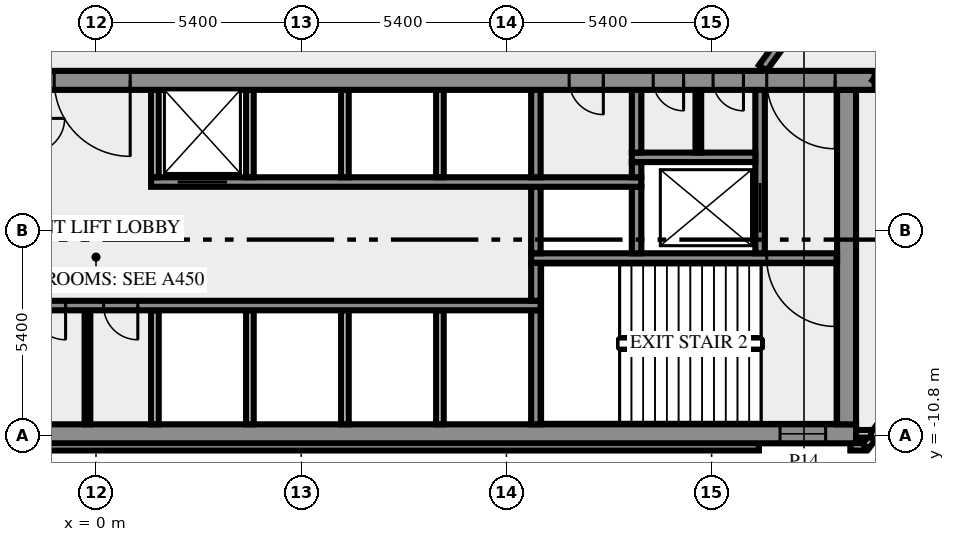
"""IFC4 building model, lengths in metres.
Left out: names, types, materials, properties, quantities, classifications, styles, units other than length and angle.
Written with IfcOpenShell. Run it as: python <this file> out.ifc"""

import sys

from ifc_helpers import new_model, si_unit, direction, frame, frame_2d, origin, place, context, subcontext, project, spatial, rectangle, extrude, element, fill, save


model = new_model("IFC4")
c1 = context("Model", 3, precision=1e-05, world=origin(), true_north=direction((0.0, 1.0)))
c2 = subcontext(c1, "Body", "Model", "MODEL_VIEW")
j1 = project(units=[si_unit("LENGTHUNIT", "METRE"), si_unit("PLANEANGLEUNIT", "RADIAN")], contexts=[c1])
p1 = place(None, origin())
s1 = spatial("IfcSite", under=j1, at=p1, CompositionType="ELEMENT")
p2 = place(p1, origin())
s2 = spatial("IfcBuilding", under=s1, at=p2, CompositionType="ELEMENT")
p3 = place(p2, frame((0.0, 0.0, 25.0)))
s3 = spatial("IfcBuildingStorey", under=s2, at=p3, CompositionType="ELEMENT", Elevation=25.0)
p4 = place(p3, frame((-17.444, -11.088, 0.0), z_axis=(0.0, 0.0, 1.0), x_axis=(1.0, 0.0, 0.0)))
e1 = element("IfcWall", 1, at=p4, inside=s3, PredefinedType="SOLIDWALL", context=c2, shape_type="SweptSolid", body=[
    extrude(rectangle(XDim=34.888, YDim=0.2, at=frame_2d((17.444, 0.0))), origin(), (0.0, 0.0, 1.0), 5.65),
])
p5 = place(p3, frame((19.85, -11.088, 0.0), z_axis=(0.0, 0.0, 1.0), x_axis=(1.0, 0.0, 0.0)))
e2 = element("IfcWall", 2, at=p5, inside=s3, PredefinedType="SOLIDWALL", context=c2, shape_type="SweptSolid", body=[
    extrude(rectangle(XDim=0.406, YDim=0.2, at=frame_2d((0.203, 0.0))), origin(), (0.0, 0.0, 1.0), 5.65),
])
p6 = place(p3, frame((20.253, -11.083, 0.0), z_axis=(0.0, 0.0, 1.0), x_axis=(0.587766567315, 0.809030569476, 0.0)))
e3 = element("IfcWall", 3, at=p6, inside=s3, PredefinedType="SOLIDWALL", context=c2, shape_type="SweptSolid", body=[
    extrude(rectangle(XDim=2.688, YDim=0.2, at=frame_2d((1.344, 0.0))), origin(), (0.0, 0.0, 1.0), 5.65),
])
p7 = place(p3, frame((19.98, -10.75, 0.0), z_axis=(0.0, 0.0, 1.0), x_axis=(1.0, 0.0, 0.0)))
e4 = element("IfcWall", 4, at=p7, inside=s3, PredefinedType="SOLIDWALL", context=c2, shape_type="SweptSolid", body=[
    extrude(rectangle(XDim=0.417, YDim=0.2, at=frame_2d((0.208, 0.0))), origin(), (0.0, 0.0, 1.0), 5.65),
])
p8 = place(p3, frame((-20.0, -10.75, 0.0), z_axis=(0.0, 0.0, 1.0), x_axis=(1.0, 0.0, 0.0)))
e5 = element("IfcWall", 5, at=p8, inside=s3, PredefinedType="SHEAR", context=c2, shape_type="SweptSolid", body=[
    extrude(rectangle(XDim=40.0, YDim=0.5, at=frame_2d((20.0, 0.0))), origin(), (0.0, 0.0, 1.0), 5.65),
])
p9 = place(p8, frame((0.8, 0.0, 1.0)))
e6 = element("IfcOpeningElement", 6, at=p9, cuts=e5, PredefinedType="OPENING", context=c2, shape_type="SweptSolid", body=[
    extrude(rectangle(XDim=1.2, YDim=1.2, at=frame_2d((0.6, 0.6))), frame((0.0, 0.26, 0.0), z_axis=(0.0, -1.0, 0.0), x_axis=(1.0, 0.0, 0.0)), (0.0, 0.0, 1.0), 0.52),
])
p10 = place(p8, frame((38.0, 0.0, 1.0)))
e7 = element("IfcOpeningElement", 7, at=p10, cuts=e5, PredefinedType="OPENING", context=c2, shape_type="SweptSolid", body=[
    extrude(rectangle(XDim=1.2, YDim=1.2, at=frame_2d((0.6, 0.6))), frame((0.0, 0.26, 0.0), z_axis=(0.0, -1.0, 0.0), x_axis=(1.0, 0.0, 0.0)), (0.0, 0.0, 1.0), 0.52),
])
p11 = place(p3, frame((-0.225, -10.5, 0.0), z_axis=(0.0, 0.0, 1.0), x_axis=(0.0, 1.0, 0.0)))
e8 = element("IfcWall", 8, at=p11, inside=s3, PredefinedType="PARTITIONING", context=c2, shape_type="SweptSolid", body=[
    extrude(rectangle(XDim=3.0, YDim=0.15, at=frame_2d((1.5, 0.0))), origin(), (0.0, 0.0, 1.0), 5.65),
])
for number, where, z_axis, x_axis in (
    (9, (1.55, -10.5, 0.0), (0.0, 0.0, 1.0), (0.0, 1.0, 0.0)),
    (10, (4.05, -10.5, 0.0), (0.0, 0.0, 1.0), (0.0, 1.0, 0.0)),
    (11, (6.55, -10.5, 0.0), (0.0, 0.0, 1.0), (0.0, 1.0, 0.0)),
    (12, (9.05, -10.5, 0.0), (0.0, 0.0, 1.0), (0.0, 1.0, 0.0)),
):
    element("IfcWall", number, at=place(p3, frame(where, z_axis=z_axis, x_axis=x_axis)), inside=s3, PredefinedType="SOLIDWALL", context=c2, shape_type="SweptSolid", body=[
        extrude(rectangle(XDim=3.0, YDim=0.2, at=frame_2d((1.5, 0.0))), origin(), (0.0, 0.0, 1.0), 5.65),
    ])
p12 = place(p3, frame((11.575, -10.5, 0.0), z_axis=(0.0, 0.0, 1.0), x_axis=(0.0, 1.0, 0.0)))
e13 = element("IfcWall", 13, at=p12, inside=s3, PredefinedType="SHEAR", context=c2, shape_type="SweptSolid", body=[
    extrude(rectangle(XDim=3.0, YDim=0.25, at=frame_2d((1.5, 0.0))), origin(), (0.0, 0.0, 1.0), 5.65),
])
p13 = place(p3, frame((19.75, -10.5, 0.0), z_axis=(0.0, 0.0, 1.0), x_axis=(0.0, 1.0, 0.0)))
e14 = element("IfcWall", 14, at=p13, inside=s3, PredefinedType="SHEAR", context=c2, shape_type="SweptSolid", body=[
    extrude(rectangle(XDim=8.8, YDim=0.5, at=frame_2d((4.4, 0.0))), origin(), (0.0, 0.0, 1.0), 5.65),
])
p14 = place(p3, frame((11.7, -7.375, 0.0), z_axis=(0.0, 0.0, 1.0), x_axis=(-1.0, 0.0, 0.0)))
e15 = element("IfcWall", 15, at=p14, inside=s3, PredefinedType="SHEAR", context=c2, shape_type="SweptSolid", body=[
    extrude(rectangle(XDim=23.4, YDim=0.25, at=frame_2d((11.7, 0.0))), origin(), (0.0, 0.0, 1.0), 5.65),
])
p15 = place(p14, frame((14.4, 0.0, 0.0)))
e16 = element("IfcOpeningElement", 16, at=p15, cuts=e15, PredefinedType="OPENING", context=c2, shape_type="SweptSolid", body=[
    extrude(rectangle(XDim=0.9, YDim=2.1, at=frame_2d((0.45, 1.05))), frame((0.0, 0.135, 0.0), z_axis=(0.0, -1.0, 0.0), x_axis=(1.0, 0.0, 0.0)), (0.0, 0.0, 1.0), 0.27),
])
p16 = place(p14, frame((12.5, 0.0, 0.0)))
e17 = element("IfcOpeningElement", 17, at=p16, cuts=e15, PredefinedType="OPENING", context=c2, shape_type="SweptSolid", body=[
    extrude(rectangle(XDim=0.9, YDim=2.1, at=frame_2d((0.45, 1.05))), frame((0.0, 0.135, 0.0), z_axis=(0.0, -1.0, 0.0), x_axis=(1.0, 0.0, 0.0)), (0.0, 0.0, 1.0), 0.27),
])
p17 = place(p14, frame((10.6, 0.0, 0.0)))
e18 = element("IfcOpeningElement", 18, at=p17, cuts=e15, PredefinedType="OPENING", context=c2, shape_type="SweptSolid", body=[
    extrude(rectangle(XDim=0.9, YDim=2.1, at=frame_2d((0.45, 1.05))), frame((0.0, 0.135, 0.0), z_axis=(0.0, -1.0, 0.0), x_axis=(1.0, 0.0, 0.0)), (0.0, 0.0, 1.0), 0.27),
])
p18 = place(p3, frame((11.575, -7.25, 0.0), z_axis=(0.0, 0.0, 1.0), x_axis=(0.0, 1.0, 0.0)))
e19 = element("IfcWall", 19, at=p18, inside=s3, PredefinedType="SHEAR", context=c2, shape_type="SweptSolid", body=[
    extrude(rectangle(XDim=1.0, YDim=0.25, at=frame_2d((0.5, 0.0))), origin(), (0.0, 0.0, 1.0), 5.65),
])
p19 = place(p3, frame((19.5, -6.125, 0.0), z_axis=(0.0, 0.0, 1.0), x_axis=(-1.0, 0.0, 0.0)))
e20 = element("IfcWall", 20, at=p19, inside=s3, PredefinedType="SHEAR", context=c2, shape_type="SweptSolid", body=[
    extrude(rectangle(XDim=8.05, YDim=0.25, at=frame_2d((4.025, 0.0))), origin(), (0.0, 0.0, 1.0), 5.65),
])
p20 = place(p19, frame((0.05, 0.0, 0.0)))
e21 = element("IfcOpeningElement", 21, at=p20, cuts=e20, PredefinedType="OPENING", context=c2, shape_type="SweptSolid", body=[
    extrude(rectangle(XDim=1.8, YDim=2.1, at=frame_2d((0.9, 1.05))), frame((0.0, 0.135, 0.0), z_axis=(0.0, -1.0, 0.0), x_axis=(1.0, 0.0, 0.0)), (0.0, 0.0, 1.0), 0.27),
])
for number, where, z_axis, x_axis in (
    (22, (11.575, -6.0, 0.0), (0.0, 0.0, 1.0), (0.0, 1.0, 0.0)),
    (23, (14.225, -6.0, 0.0), (0.0, 0.0, 1.0), (0.0, 1.0, 0.0)),
):
    element("IfcWall", number, at=place(p3, frame(where, z_axis=z_axis, x_axis=x_axis)), inside=s3, PredefinedType="SHEAR", context=c2, shape_type="SweptSolid", body=[
        extrude(rectangle(XDim=1.75, YDim=0.25, at=frame_2d((0.875, 0.0))), origin(), (0.0, 0.0, 1.0), 5.65),
    ])
p21 = place(p3, frame((17.475, -6.0, 0.0), z_axis=(0.0, 0.0, 1.0), x_axis=(0.0, 1.0, 0.0)))
e24 = element("IfcWall", 24, at=p21, inside=s3, PredefinedType="SHEAR", context=c2, shape_type="SweptSolid", body=[
    extrude(rectangle(XDim=4.3, YDim=0.25, at=frame_2d((2.15, 0.0))), origin(), (0.0, 0.0, 1.0), 5.65),
])
p22 = place(p21, frame((0.55, 0.0, 0.0)))
e25 = element("IfcOpeningElement", 25, at=p22, cuts=e24, PredefinedType="OPENING", context=c2, shape_type="SweptSolid", body=[
    extrude(rectangle(XDim=1.3, YDim=2.1, at=frame_2d((0.65, 1.05))), frame((0.0, 0.135, 0.0), z_axis=(0.0, -1.0, 0.0), x_axis=(1.0, 0.0, 0.0)), (0.0, 0.0, 1.0), 0.27),
])
p23 = place(p3, frame((1.45, -4.125, 0.0), z_axis=(0.0, 0.0, 1.0), x_axis=(1.0, 0.0, 0.0)))
e26 = element("IfcWall", 26, at=p23, inside=s3, PredefinedType="SHEAR", context=c2, shape_type="SweptSolid", body=[
    extrude(rectangle(XDim=12.9, YDim=0.25, at=frame_2d((6.45, 0.0))), origin(), (0.0, 0.0, 1.0), 5.65),
])
p24 = place(p23, frame((0.7, 0.0, 0.0)))
e27 = element("IfcOpeningElement", 27, at=p24, cuts=e26, PredefinedType="OPENING", context=c2, shape_type="SweptSolid", body=[
    extrude(rectangle(XDim=1.3, YDim=2.1, at=frame_2d((0.65, 1.05))), frame((0.0, 0.135, 0.0), z_axis=(0.0, -1.0, 0.0), x_axis=(1.0, 0.0, 0.0)), (0.0, 0.0, 1.0), 0.27),
])
for number, where, z_axis, x_axis in (
    (28, (1.55, -4.0, 0.0), (0.0, 0.0, 1.0), (0.0, 1.0, 0.0)),
    (29, (4.05, -4.0, 0.0), (0.0, 0.0, 1.0), (0.0, 1.0, 0.0)),
    (30, (6.55, -4.0, 0.0), (0.0, 0.0, 1.0), (0.0, 1.0, 0.0)),
    (31, (9.05, -4.0, 0.0), (0.0, 0.0, 1.0), (0.0, 1.0, 0.0)),
):
    element("IfcWall", number, at=place(p3, frame(where, z_axis=z_axis, x_axis=x_axis)), inside=s3, PredefinedType="SOLIDWALL", context=c2, shape_type="SweptSolid", body=[
        extrude(rectangle(XDim=2.3, YDim=0.2, at=frame_2d((1.15, 0.0))), origin(), (0.0, 0.0, 1.0), 5.65),
    ])
p25 = place(p3, frame((11.575, -4.0, 0.0), z_axis=(0.0, 0.0, 1.0), x_axis=(0.0, 1.0, 0.0)))
e32 = element("IfcWall", 32, at=p25, inside=s3, PredefinedType="SHEAR", context=c2, shape_type="SweptSolid", body=[
    extrude(rectangle(XDim=2.3, YDim=0.25, at=frame_2d((1.15, 0.0))), origin(), (0.0, 0.0, 1.0), 5.65),
])
p26 = place(p3, frame((14.225, -4.0, 0.0), z_axis=(0.0, 0.0, 1.0), x_axis=(0.0, 1.0, 0.0)))
e33 = element("IfcWall", 33, at=p26, inside=s3, PredefinedType="SHEAR", context=c2, shape_type="SweptSolid", body=[
    extrude(rectangle(XDim=0.4, YDim=0.25, at=frame_2d((0.2, 0.0))), origin(), (0.0, 0.0, 1.0), 5.65),
])
p27 = place(p3, frame((14.1, -3.475, 0.0), z_axis=(0.0, 0.0, 1.0), x_axis=(1.0, 0.0, 0.0)))
e34 = element("IfcWall", 34, at=p27, inside=s3, PredefinedType="SHEAR", context=c2, shape_type="SweptSolid", body=[
    extrude(rectangle(XDim=3.25, YDim=0.25, at=frame_2d((1.625, 0.0))), origin(), (0.0, 0.0, 1.0), 5.65),
])
p28 = place(p3, frame((14.225, -3.35, 0.0), z_axis=(0.0, 0.0, 1.0), x_axis=(0.0, 1.0, 0.0)))
e35 = element("IfcWall", 35, at=p28, inside=s3, PredefinedType="SHEAR", context=c2, shape_type="SweptSolid", body=[
    extrude(rectangle(XDim=1.65, YDim=0.25, at=frame_2d((0.825, 0.0))), origin(), (0.0, 0.0, 1.0), 5.65),
])
p29 = place(p3, frame((15.85, -3.35, 0.0), z_axis=(0.0, 0.0, 1.0), x_axis=(0.0, 1.0, 0.0)))
e36 = element("IfcWall", 36, at=p29, inside=s3, PredefinedType="PARTITIONING", context=c2, shape_type="SweptSolid", body=[
    extrude(rectangle(XDim=1.65, YDim=0.15, at=frame_2d((0.825, 0.0))), origin(), (0.0, 0.0, 1.0), 5.65),
])
p30 = place(p3, frame((20.49, -1.45, 0.0), z_axis=(0.0, 0.0, 1.0), x_axis=(-1.0, 0.0, 0.0)))
e37 = element("IfcWall", 37, at=p30, inside=s3, PredefinedType="SHEAR", context=c2, shape_type="SweptSolid", body=[
    extrude(rectangle(XDim=40.98, YDim=0.5, at=frame_2d((20.49, 0.0))), origin(), (0.0, 0.0, 1.0), 5.65),
])
p31 = place(p30, frame((38.14, 0.0, 0.0)))
e38 = element("IfcOpeningElement", 38, at=p31, cuts=e37, PredefinedType="OPENING", context=c2, shape_type="SweptSolid", body=[
    extrude(rectangle(XDim=1.8, YDim=2.1, at=frame_2d((0.9, 1.05))), frame((0.0, 0.26, 0.0), z_axis=(0.0, -1.0, 0.0), x_axis=(1.0, 0.0, 0.0)), (0.0, 0.0, 1.0), 0.52),
])
p32 = place(p30, frame((35.89, 0.0, 0.0)))
e39 = element("IfcOpeningElement", 39, at=p32, cuts=e37, PredefinedType="OPENING", context=c2, shape_type="SweptSolid", body=[
    extrude(rectangle(XDim=0.9, YDim=2.1, at=frame_2d((0.45, 1.05))), frame((0.0, 0.26, 0.0), z_axis=(0.0, -1.0, 0.0), x_axis=(1.0, 0.0, 0.0)), (0.0, 0.0, 1.0), 0.52),
])
p33 = place(p30, frame((32.94, 0.0, 0.0)))
e40 = element("IfcOpeningElement", 40, at=p33, cuts=e37, PredefinedType="OPENING", context=c2, shape_type="SweptSolid", body=[
    extrude(rectangle(XDim=0.9, YDim=2.1, at=frame_2d((0.45, 1.05))), frame((0.0, 0.26, 0.0), z_axis=(0.0, -1.0, 0.0), x_axis=(1.0, 0.0, 0.0)), (0.0, 0.0, 1.0), 0.52),
])
p34 = place(p30, frame((19.59, 0.0, 0.0)))
e41 = element("IfcOpeningElement", 41, at=p34, cuts=e37, PredefinedType="OPENING", context=c2, shape_type="SweptSolid", body=[
    extrude(rectangle(XDim=2.0, YDim=2.1, at=frame_2d((1.0, 1.05))), frame((0.0, 0.26, 0.0), z_axis=(0.0, -1.0, 0.0), x_axis=(1.0, 0.0, 0.0)), (0.0, 0.0, 1.0), 0.52),
])
p35 = place(p30, frame((7.14, 0.0, 0.0)))
e42 = element("IfcOpeningElement", 42, at=p35, cuts=e37, PredefinedType="OPENING", context=c2, shape_type="SweptSolid", body=[
    extrude(rectangle(XDim=0.9, YDim=2.1, at=frame_2d((0.45, 1.05))), frame((0.0, 0.26, 0.0), z_axis=(0.0, -1.0, 0.0), x_axis=(1.0, 0.0, 0.0)), (0.0, 0.0, 1.0), 0.52),
])
p36 = place(p30, frame((5.028, 0.0, 0.0)))
e43 = element("IfcOpeningElement", 43, at=p36, cuts=e37, PredefinedType="OPENING", context=c2, shape_type="SweptSolid", body=[
    extrude(rectangle(XDim=0.8, YDim=2.1, at=frame_2d((0.4, 1.05))), frame((0.0, 0.26, 0.0), z_axis=(0.0, -1.0, 0.0), x_axis=(1.0, 0.0, 0.0)), (0.0, 0.0, 1.0), 0.52),
])
p37 = place(p30, frame((3.452, 0.0, 0.0)))
e44 = element("IfcOpeningElement", 44, at=p37, cuts=e37, PredefinedType="OPENING", context=c2, shape_type="SweptSolid", body=[
    extrude(rectangle(XDim=0.8, YDim=2.1, at=frame_2d((0.4, 1.05))), frame((0.0, 0.26, 0.0), z_axis=(0.0, -1.0, 0.0), x_axis=(1.0, 0.0, 0.0)), (0.0, 0.0, 1.0), 0.52),
])
p38 = place(p30, frame((1.04, 0.0, 0.0)))
e45 = element("IfcOpeningElement", 45, at=p38, cuts=e37, PredefinedType="OPENING", context=c2, shape_type="SweptSolid", body=[
    extrude(rectangle(XDim=1.8, YDim=2.1, at=frame_2d((0.9, 1.05))), frame((0.0, 0.26, 0.0), z_axis=(0.0, -1.0, 0.0), x_axis=(1.0, 0.0, 0.0)), (0.0, 0.0, 1.0), 0.52),
])
p39 = place(p3, frame((49.989, 39.022, 0.0), z_axis=(0.0, 0.0, 1.0), x_axis=(-0.587782625701, -0.809018902699, 0.0)))
e46 = element("IfcWall", 46, at=p39, inside=s3, PredefinedType="SOLIDWALL", context=c2, shape_type="SweptSolid", body=[
    extrude(rectangle(XDim=50.117, YDim=0.25, at=frame_2d((25.058, 0.0))), origin(), (0.0, 0.0, 1.0), 5.65),
])
p40 = place(p39, frame((37.051, 0.0, 0.0)))
e47 = element("IfcOpeningElement", 47, at=p40, cuts=e46, PredefinedType="OPENING", context=c2, shape_type="SweptSolid", body=[
    extrude(rectangle(XDim=1.2, YDim=2.1, at=frame_2d((0.6, 1.05))), frame((0.0, 0.135, 0.0), z_axis=(0.0, -1.0, 0.0), x_axis=(1.0, 0.0, 0.0)), (0.0, 0.0, 1.0), 0.27),
])
p41 = place(p39, frame((20.851, 0.0, 0.0)))
e48 = element("IfcOpeningElement", 48, at=p41, cuts=e46, PredefinedType="OPENING", context=c2, shape_type="SweptSolid", body=[
    extrude(rectangle(XDim=1.2, YDim=2.1, at=frame_2d((0.6, 1.05))), frame((0.0, 0.135, 0.0), z_axis=(0.0, -1.0, 0.0), x_axis=(1.0, 0.0, 0.0)), (0.0, 0.0, 1.0), 0.27),
])
p42 = place(p39, frame((48.384, 0.0, 0.0)))
e49 = element("IfcOpeningElement", 49, at=p42, cuts=e46, PredefinedType="OPENING", context=c2, shape_type="SweptSolid", body=[
    extrude(rectangle(XDim=1.2, YDim=2.1, at=frame_2d((0.6, 1.05))), frame((0.0, 0.135, 0.0), z_axis=(0.0, -1.0, 0.0), x_axis=(1.0, 0.0, 0.0)), (0.0, 0.0, 1.0), 0.27),
])
p43 = place(p39, frame((26.45, 0.0, 0.0)))
e50 = element("IfcOpeningElement", 50, at=p43, cuts=e46, PredefinedType="OPENING", context=c2, shape_type="SweptSolid", body=[
    extrude(rectangle(XDim=1.0, YDim=2.1, at=frame_2d((0.5, 1.05))), frame((0.0, 0.135, 0.0), z_axis=(0.0, -1.0, 0.0), x_axis=(1.0, 0.0, 0.0)), (0.0, 0.0, 1.0), 0.27),
])
p44 = place(p3, frame((17.545, -1.125, 0.0), z_axis=(0.0, 0.0, 1.0), x_axis=(0.587786323093, 0.809016216391, 0.0)))
e51 = element("IfcWall", 51, at=p44, inside=s3, PredefinedType="SOLIDWALL", context=c2, shape_type="SweptSolid", body=[
    extrude(rectangle(XDim=33.493, YDim=0.25, at=frame_2d((16.747, 0.0))), origin(), (0.0, 0.0, 1.0), 5.65),
])
p45 = place(p44, frame((24.508, 0.0, 0.0)))
e52 = element("IfcOpeningElement", 52, at=p45, cuts=e51, PredefinedType="OPENING", context=c2, shape_type="SweptSolid", body=[
    extrude(rectangle(XDim=1.2, YDim=2.1, at=frame_2d((0.6, 1.05))), frame((0.0, 0.135, 0.0), z_axis=(0.0, -1.0, 0.0), x_axis=(1.0, 0.0, 0.0)), (0.0, 0.0, 1.0), 0.27),
])
p46 = place(p44, frame((17.207, 0.0, 0.0)))
e53 = element("IfcOpeningElement", 53, at=p46, cuts=e51, PredefinedType="OPENING", context=c2, shape_type="SweptSolid", body=[
    extrude(rectangle(XDim=1.2, YDim=2.1, at=frame_2d((0.6, 1.05))), frame((0.0, 0.135, 0.0), z_axis=(0.0, -1.0, 0.0), x_axis=(1.0, 0.0, 0.0)), (0.0, 0.0, 1.0), 0.27),
])
p47 = place(p44, frame((22.908, 0.0, 0.0)))
e54 = element("IfcOpeningElement", 54, at=p47, cuts=e51, PredefinedType="OPENING", context=c2, shape_type="SweptSolid", body=[
    extrude(rectangle(XDim=0.9, YDim=2.1, at=frame_2d((0.45, 1.05))), frame((0.0, 0.135, 0.0), z_axis=(0.0, -1.0, 0.0), x_axis=(1.0, 0.0, 0.0)), (0.0, 0.0, 1.0), 0.27),
])
p48 = place(p10, origin())
e55 = element("IfcWindow", 55, at=p48, inside=s3, PartitioningType="SINGLE_PANEL", PredefinedType="WINDOW", context=c2, shape_type="SweptSolid", body=[
    extrude(rectangle(XDim=1.2, YDim=1.2, at=frame_2d((0.6, 0.6))), frame((0.0, 0.03, 0.0), z_axis=(0.0, -1.0, 0.0), x_axis=(1.0, 0.0, 0.0)), (0.0, 0.0, 1.0), 0.06),
])
fill(e7, e55)
p49 = place(p16, origin())
e56 = element("IfcDoor", 56, at=p49, inside=s3, OperationType="SINGLE_SWING_RIGHT", PredefinedType="DOOR", context=c2, shape_type="SweptSolid", body=[
    extrude(rectangle(XDim=0.9, YDim=2.1, at=frame_2d((0.45, 1.05))), frame((0.0, 0.025, 0.0), z_axis=(0.0, -1.0, 0.0), x_axis=(1.0, 0.0, 0.0)), (0.0, 0.0, 1.0), 0.05),
])
fill(e17, e56)
p50 = place(p17, origin())
e57 = element("IfcDoor", 57, at=p50, inside=s3, OperationType="SINGLE_SWING_LEFT", PredefinedType="DOOR", context=c2, shape_type="SweptSolid", body=[
    extrude(rectangle(XDim=0.9, YDim=2.1, at=frame_2d((0.45, 1.05))), frame((0.0, 0.025, 0.0), z_axis=(0.0, -1.0, 0.0), x_axis=(1.0, 0.0, 0.0)), (0.0, 0.0, 1.0), 0.05),
])
fill(e18, e57)
p51 = place(p20, origin())
e58 = element("IfcDoor", 58, at=p51, inside=s3, OperationType="DOUBLE_DOOR_SINGLE_SWING", PredefinedType="DOOR", context=c2, shape_type="SweptSolid", body=[
    extrude(rectangle(XDim=1.8, YDim=2.1, at=frame_2d((0.9, 1.05))), frame((0.0, 0.025, 0.0), z_axis=(0.0, -1.0, 0.0), x_axis=(1.0, 0.0, 0.0)), (0.0, 0.0, 1.0), 0.05),
])
fill(e21, e58)
p52 = place(p22, origin())
e59 = element("IfcDoor", 59, at=p52, inside=s3, OperationType="DOUBLE_DOOR_SLIDING", PredefinedType="DOOR", context=c2, shape_type="SweptSolid", body=[
    extrude(rectangle(XDim=1.3, YDim=2.1, at=frame_2d((0.65, 1.05))), frame((0.0, 0.025, 0.0), z_axis=(0.0, -1.0, 0.0), x_axis=(1.0, 0.0, 0.0)), (0.0, 0.0, 1.0), 0.05),
])
fill(e25, e59)
p53 = place(p24, origin())
e60 = element("IfcDoor", 60, at=p53, inside=s3, OperationType="DOUBLE_DOOR_SLIDING", PredefinedType="DOOR", context=c2, shape_type="SweptSolid", body=[
    extrude(rectangle(XDim=1.3, YDim=2.1, at=frame_2d((0.65, 1.05))), frame((0.0, 0.025, 0.0), z_axis=(0.0, -1.0, 0.0), x_axis=(1.0, 0.0, 0.0)), (0.0, 0.0, 1.0), 0.05),
])
fill(e27, e60)
p54 = place(p34, origin())
e61 = element("IfcDoor", 61, at=p54, inside=s3, OperationType="DOUBLE_DOOR_SINGLE_SWING", PredefinedType="DOOR", context=c2, shape_type="SweptSolid", body=[
    extrude(rectangle(XDim=2.0, YDim=2.1, at=frame_2d((1.0, 1.05))), frame((0.0, 0.025, 0.0), z_axis=(0.0, -1.0, 0.0), x_axis=(1.0, 0.0, 0.0)), (0.0, 0.0, 1.0), 0.05),
])
fill(e41, e61)
p55 = place(p35, origin())
e62 = element("IfcDoor", 62, at=p55, inside=s3, OperationType="SINGLE_SWING_LEFT", PredefinedType="DOOR", context=c2, shape_type="SweptSolid", body=[
    extrude(rectangle(XDim=0.9, YDim=2.1, at=frame_2d((0.45, 1.05))), frame((0.0, 0.025, 0.0), z_axis=(0.0, -1.0, 0.0), x_axis=(1.0, 0.0, 0.0)), (0.0, 0.0, 1.0), 0.05),
])
fill(e42, e62)
p56 = place(p36, origin())
e63 = element("IfcDoor", 63, at=p56, inside=s3, OperationType="SINGLE_SWING_LEFT", PredefinedType="DOOR", context=c2, shape_type="SweptSolid", body=[
    extrude(rectangle(XDim=0.8, YDim=2.1, at=frame_2d((0.4, 1.05))), frame((0.0, 0.025, 0.0), z_axis=(0.0, -1.0, 0.0), x_axis=(1.0, 0.0, 0.0)), (0.0, 0.0, 1.0), 0.05),
])
fill(e43, e63)
p57 = place(p37, origin())
e64 = element("IfcDoor", 64, at=p57, inside=s3, OperationType="SINGLE_SWING_LEFT", PredefinedType="DOOR", context=c2, shape_type="SweptSolid", body=[
    extrude(rectangle(XDim=0.8, YDim=2.1, at=frame_2d((0.4, 1.05))), frame((0.0, 0.025, 0.0), z_axis=(0.0, -1.0, 0.0), x_axis=(1.0, 0.0, 0.0)), (0.0, 0.0, 1.0), 0.05),
])
fill(e44, e64)
p58 = place(p38, origin())
e65 = element("IfcDoor", 65, at=p58, inside=s3, OperationType="DOUBLE_DOOR_SINGLE_SWING", PredefinedType="DOOR", context=c2, shape_type="SweptSolid", body=[
    extrude(rectangle(XDim=1.8, YDim=2.1, at=frame_2d((0.9, 1.05))), frame((0.0, 0.025, 0.0), z_axis=(0.0, -1.0, 0.0), x_axis=(1.0, 0.0, 0.0)), (0.0, 0.0, 1.0), 0.05),
])
fill(e45, e65)
save(model, sys.argv[1])
